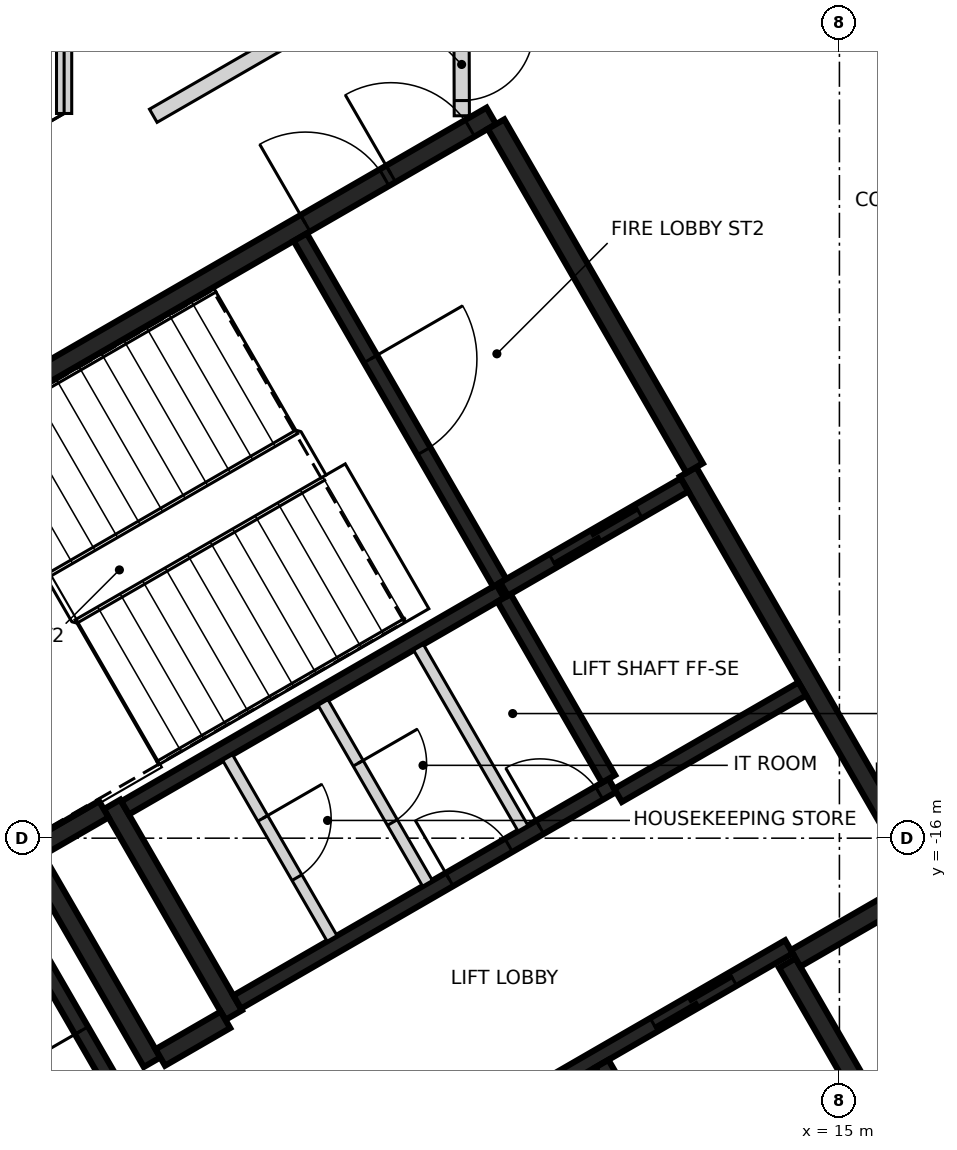
"""IFC4 building model, lengths in metres.
Left out: names, types, materials, properties, quantities, classifications, styles, units other than length and angle.
Written with IfcOpenShell. Run it as: python <this file> out.ifc"""

import sys

from ifc_helpers import new_model, si_unit, direction, frame, frame_2d, origin, place, context, subcontext, project, spatial, rectangle, extrude, element, fill, save


model = new_model("IFC4")
c1 = context("Model", 3, precision=1e-05, world=origin(), true_north=direction((0.0, 1.0)))
c2 = subcontext(c1, "Body", "Model", "MODEL_VIEW")
j1 = project(units=[si_unit("LENGTHUNIT", "METRE"), si_unit("PLANEANGLEUNIT", "RADIAN")], contexts=[c1])
p1 = place(None, origin())
s1 = spatial("IfcSite", under=j1, at=p1, CompositionType="ELEMENT")
p2 = place(p1, origin())
s2 = spatial("IfcBuilding", under=s1, at=p2, CompositionType="ELEMENT")
p3 = place(p2, frame((0.0, 0.0, 157.6)))
s3 = spatial("IfcBuildingStorey", under=s2, at=p3, CompositionType="ELEMENT", Elevation=157.6)
p4 = place(p3, frame((0.417, -12.273, 0.0), z_axis=(0.0, 0.0, 1.0), x_axis=(0.866021906294, 0.500006057782, 0.0)))
e1 = element("IfcWall", 1, at=p4, inside=s3, PredefinedType="SHEAR", context=c2, shape_type="SweptSolid", body=[
    extrude(rectangle(XDim=11.55, YDim=0.25, at=frame_2d((5.775, 0.0))), origin(), (0.0, 0.0, 1.0), 3.2),
])
p5 = place(p4, frame((10.025, 0.0, 0.0)))
e2 = element("IfcOpeningElement", 2, at=p5, cuts=e1, PredefinedType="OPENING", context=c2, shape_type="SweptSolid", body=[
    extrude(rectangle(XDim=1.2, YDim=2.1, at=frame_2d((0.6, 1.05))), frame((0.0, 0.135, 0.0), z_axis=(0.0, -1.0, 0.0), x_axis=(1.0, 0.0, 0.0)), (0.0, 0.0, 1.0), 0.27),
])
p6 = place(p4, frame((8.725, 0.0, 0.0)))
e3 = element("IfcOpeningElement", 3, at=p6, cuts=e1, PredefinedType="OPENING", context=c2, shape_type="SweptSolid", body=[
    extrude(rectangle(XDim=1.2, YDim=2.1, at=frame_2d((0.6, 1.05))), frame((0.0, 0.135, 0.0), z_axis=(0.0, -1.0, 0.0), x_axis=(1.0, 0.0, 0.0)), (0.0, 0.0, 1.0), 0.27),
])
p7 = place(p3, frame((13.008, -11.181, 0.0), z_axis=(0.0, 0.0, 1.0), x_axis=(0.500004234368, -0.866022959057, 0.0)))
e4 = element("IfcWall", 4, at=p7, inside=s3, PredefinedType="SHEAR", context=c2, shape_type="SweptSolid", body=[
    extrude(rectangle(XDim=6.25, YDim=0.25, at=frame_2d((3.125, 0.0))), origin(), (0.0, 0.0, 1.0), 3.2),
])
p8 = place(p3, frame((10.483, -6.606, 0.0), z_axis=(0.0, 0.0, 1.0), x_axis=(0.49999885962, -0.866026062182, 0.0)))
e5 = element("IfcWall", 5, at=p8, inside=s3, PredefinedType="SHEAR", context=c2, shape_type="SweptSolid", body=[
    extrude(rectangle(XDim=5.225, YDim=0.25, at=frame_2d((2.612, 0.0))), origin(), (0.0, 0.0, 1.0), 3.2),
])
p9 = place(p3, frame((7.031, -18.327, 0.0), z_axis=(0.0, 0.0, 1.0), x_axis=(-0.499971222258, 0.866042017984, 0.0)))
e6 = element("IfcWall", 6, at=p9, inside=s3, PredefinedType="SHEAR", context=c2, shape_type="SweptSolid", body=[
    extrude(rectangle(XDim=3.2, YDim=0.25, at=frame_2d((1.6, 0.0))), origin(), (0.0, 0.0, 1.0), 3.2),
])
p10 = place(p3, frame((14.315, -17.644, 0.0), z_axis=(0.0, 0.0, 1.0), x_axis=(0.500023226632, -0.866011993467, 0.0)))
e7 = element("IfcWall", 7, at=p10, inside=s3, PredefinedType="SHEAR", context=c2, shape_type="SweptSolid", body=[
    extrude(rectangle(XDim=2.974, YDim=0.25, at=frame_2d((1.487, 0.0))), origin(), (0.0, 0.0, 1.0), 3.2),
])
p11 = place(p3, frame((4.414, -16.276, 0.0), z_axis=(0.0, 0.0, 1.0), x_axis=(0.500003324108, -0.866023484601, 0.0)))
e8 = element("IfcWall", 8, at=p11, inside=s3, PredefinedType="SHEAR", context=c2, shape_type="SweptSolid", body=[
    extrude(rectangle(XDim=3.085, YDim=0.25, at=frame_2d((1.542, 0.0))), origin(), (0.0, 0.0, 1.0), 3.2),
])
p12 = place(p3, frame((5.322, -15.619, 0.0), z_axis=(0.0, 0.0, 1.0), x_axis=(-0.866026229868, -0.499998569178, 0.0)))
e9 = element("IfcWall", 9, at=p12, inside=s3, PredefinedType="SHEAR", context=c2, shape_type="SweptSolid", body=[
    extrude(rectangle(XDim=2.449, YDim=0.25, at=frame_2d((1.225, 0.0))), origin(), (0.0, 0.0, 1.0), 3.2),
])
p13 = place(p3, frame((16.025, -16.656, 0.0), z_axis=(0.0, 0.0, 1.0), x_axis=(-0.866016279763, -0.500015802937, 0.0)))
e10 = element("IfcWall", 10, at=p13, inside=s3, PredefinedType="SHEAR", context=c2, shape_type="SweptSolid", body=[
    extrude(rectangle(XDim=1.849, YDim=0.25, at=frame_2d((0.925, 0.0))), origin(), (0.0, 0.0, 1.0), 3.2),
])
p14 = place(p3, frame((6.065, -18.885, 0.0), z_axis=(0.0, 0.0, 1.0), x_axis=(0.866017078145, 0.500014420154, 0.0)))
e11 = element("IfcWall", 11, at=p14, inside=s3, PredefinedType="SHEAR", context=c2, shape_type="SweptSolid", body=[
    extrude(rectangle(XDim=0.989, YDim=0.25, at=frame_2d((0.495, 0.0))), origin(), (0.0, 0.0, 1.0), 3.2),
])
p15 = place(p3, frame((9.052, -20.48, 0.0), z_axis=(0.0, 0.0, 1.0), x_axis=(0.866030299012, 0.499991521122, 0.0)))
e12 = element("IfcWall", 12, at=p15, inside=s3, PredefinedType="SHEAR", context=c2, shape_type="SweptSolid", body=[
    extrude(rectangle(XDim=6.1, YDim=0.2, at=frame_2d((3.05, 0.0))), origin(), (0.0, 0.0, 1.0), 3.2),
])
p16 = place(p15, frame((1.0, 0.0, 0.0)))
e13 = element("IfcOpeningElement", 13, at=p16, cuts=e12, PredefinedType="OPENING", context=c2, shape_type="SweptSolid", body=[
    extrude(rectangle(XDim=1.2, YDim=2.1, at=frame_2d((0.6, 1.05))), frame((0.0, 0.11, 0.0), z_axis=(0.0, -1.0, 0.0), x_axis=(1.0, 0.0, 0.0)), (0.0, 0.0, 1.0), 0.22),
])
p17 = place(p15, frame((4.05, 0.0, 0.0)))
e14 = element("IfcOpeningElement", 14, at=p17, cuts=e12, PredefinedType="OPENING", context=c2, shape_type="SweptSolid", body=[
    extrude(rectangle(XDim=1.2, YDim=2.1, at=frame_2d((0.6, 1.05))), frame((0.0, 0.11, 0.0), z_axis=(0.0, -1.0, 0.0), x_axis=(1.0, 0.0, 0.0)), (0.0, 0.0, 1.0), 0.22),
])
p18 = place(p3, frame((10.538, -12.752, 0.0), z_axis=(0.0, 0.0, 1.0), x_axis=(-0.866038630372, -0.499977090179, 0.0)))
e15 = element("IfcWall", 15, at=p18, inside=s3, PredefinedType="SHEAR", context=c2, shape_type="SweptSolid", body=[
    extrude(rectangle(XDim=5.699, YDim=0.2, at=frame_2d((2.85, 0.0))), origin(), (0.0, 0.0, 1.0), 3.2),
])
p19 = place(p3, frame((7.077, -18.156, 0.0), z_axis=(0.0, 0.0, 1.0), x_axis=(0.866038630372, 0.499977090179, 0.0)))
e16 = element("IfcWall", 16, at=p19, inside=s3, PredefinedType="SHEAR", context=c2, shape_type="SweptSolid", body=[
    extrude(rectangle(XDim=5.699, YDim=0.2, at=frame_2d((2.85, 0.0))), origin(), (0.0, 0.0, 1.0), 3.2),
])
p20 = place(p19, frame((3.224, 0.0, 0.0)))
e17 = element("IfcOpeningElement", 17, at=p20, cuts=e16, PredefinedType="OPENING", context=c2, shape_type="SweptSolid", body=[
    extrude(rectangle(XDim=0.9, YDim=2.1, at=frame_2d((0.45, 1.05))), frame((0.0, 0.11, 0.0), z_axis=(0.0, -1.0, 0.0), x_axis=(1.0, 0.0, 0.0)), (0.0, 0.0, 1.0), 0.22),
])
p21 = place(p19, frame((4.599, 0.0, 0.0)))
e18 = element("IfcOpeningElement", 18, at=p21, cuts=e16, PredefinedType="OPENING", context=c2, shape_type="SweptSolid", body=[
    extrude(rectangle(XDim=0.9, YDim=2.1, at=frame_2d((0.45, 1.05))), frame((0.0, 0.11, 0.0), z_axis=(0.0, -1.0, 0.0), x_axis=(1.0, 0.0, 0.0)), (0.0, 0.0, 1.0), 0.22),
])
p22 = place(p3, frame((7.906, -8.094, 0.0), z_axis=(0.0, 0.0, 1.0), x_axis=(0.500024287448, -0.866011380966, 0.0)))
e19 = element("IfcWall", 19, at=p22, inside=s3, PredefinedType="SHEAR", context=c2, shape_type="SweptSolid", body=[
    extrude(rectangle(XDim=5.251, YDim=0.2, at=frame_2d((2.625, 0.0))), origin(), (0.0, 0.0, 1.0), 3.2),
])
p23 = place(p22, frame((1.849, 0.0, 0.0)))
e20 = element("IfcOpeningElement", 20, at=p23, cuts=e19, PredefinedType="OPENING", context=c2, shape_type="SweptSolid", body=[
    extrude(rectangle(XDim=1.4, YDim=2.1, at=frame_2d((0.7, 1.05))), frame((0.0, 0.11, 0.0), z_axis=(0.0, -1.0, 0.0), x_axis=(1.0, 0.0, 0.0)), (0.0, 0.0, 1.0), 0.22),
])
p24 = place(p3, frame((11.875, -18.967, 0.0), z_axis=(0.0, 0.0, 1.0), x_axis=(0.49998131003, -0.866036194175, 0.0)))
e21 = element("IfcWall", 21, at=p24, inside=s3, PredefinedType="SHEAR", context=c2, shape_type="SweptSolid", body=[
    extrude(rectangle(XDim=3.048, YDim=0.2, at=frame_2d((1.524, 0.0))), origin(), (0.0, 0.0, 1.0), 3.2),
])
p25 = place(p3, frame((5.503, -19.352, 0.0), z_axis=(0.0, 0.0, 1.0), x_axis=(-0.499986818241, 0.866033014143, 0.0)))
e22 = element("IfcWall", 22, at=p25, inside=s3, PredefinedType="SHEAR", context=c2, shape_type="SweptSolid", body=[
    extrude(rectangle(XDim=2.798, YDim=0.2, at=frame_2d((1.399, 0.0))), origin(), (0.0, 0.0, 1.0), 3.2),
])
p26 = place(p25, frame((0.949, 0.0, 0.0)))
e23 = element("IfcOpeningElement", 23, at=p26, cuts=e22, PredefinedType="OPENING", context=c2, shape_type="SweptSolid", body=[
    extrude(rectangle(XDim=0.9, YDim=2.1, at=frame_2d((0.45, 1.05))), frame((0.0, 0.11, 0.0), z_axis=(0.0, -1.0, 0.0), x_axis=(1.0, 0.0, 0.0)), (0.0, 0.0, 1.0), 0.22),
])
p27 = place(p3, frame((11.963, -15.22, 0.0), z_axis=(0.0, 0.0, 1.0), x_axis=(-0.500034990121, 0.866005201286, 0.0)))
e24 = element("IfcWall", 24, at=p27, inside=s3, PredefinedType="SHEAR", context=c2, shape_type="SweptSolid", body=[
    extrude(rectangle(XDim=2.75, YDim=0.2, at=frame_2d((1.375, 0.0))), origin(), (0.0, 0.0, 1.0), 3.2),
])
p28 = place(p3, frame((10.587, -12.723, 0.0), z_axis=(0.0, 0.0, 1.0), x_axis=(0.866037306777, 0.499979382845, 0.0)))
e25 = element("IfcWall", 25, at=p28, inside=s3, PredefinedType="SHEAR", context=c2, shape_type="SweptSolid", body=[
    extrude(rectangle(XDim=2.742, YDim=0.2, at=frame_2d((1.371, 0.0))), origin(), (0.0, 0.0, 1.0), 3.2),
])
p29 = place(p28, frame((0.743, 0.0, 0.0)))
e26 = element("IfcOpeningElement", 26, at=p29, cuts=e25, PredefinedType="OPENING", context=c2, shape_type="SweptSolid", body=[
    extrude(rectangle(XDim=1.3, YDim=2.1, at=frame_2d((0.65, 1.05))), frame((0.0, 0.11, 0.0), z_axis=(0.0, -1.0, 0.0), x_axis=(1.0, 0.0, 0.0)), (0.0, 0.0, 1.0), 0.22),
])
p30 = place(p3, frame((14.512, -14.037, 0.0), z_axis=(0.0, 0.0, 1.0), x_axis=(-0.866044696403, -0.499966582715, 0.0)))
e27 = element("IfcWall", 27, at=p30, inside=s3, PredefinedType="SHEAR", context=c2, shape_type="SweptSolid", body=[
    extrude(rectangle(XDim=2.799, YDim=0.2, at=frame_2d((1.399, 0.0))), origin(), (0.0, 0.0, 1.0), 3.2),
])
p31 = place(p3, frame((8.207, -14.214, 0.0), z_axis=(0.0, 0.0, 1.0), x_axis=(0.50002746344, -0.86600954718, 0.0)))
e28 = element("IfcWall", 28, at=p31, inside=s3, PredefinedType="PARTITIONING", context=c2, shape_type="SweptSolid", body=[
    extrude(rectangle(XDim=2.748, YDim=0.15, at=frame_2d((1.374, 0.0))), origin(), (0.0, 0.0, 1.0), 3.2),
])
p32 = place(p31, frame((0.924, 0.0, 0.0)))
e29 = element("IfcOpeningElement", 29, at=p32, cuts=e28, PredefinedType="OPENING", context=c2, shape_type="SweptSolid", body=[
    extrude(rectangle(XDim=0.9, YDim=2.1, at=frame_2d((0.45, 1.05))), frame((0.0, 0.085, 0.0), z_axis=(0.0, -1.0, 0.0), x_axis=(1.0, 0.0, 0.0)), (0.0, 0.0, 1.0), 0.17),
])
p33 = place(p3, frame((9.462, -13.489, 0.0), z_axis=(0.0, 0.0, 1.0), x_axis=(0.499988999718, -0.866031754707, 0.0)))
e30 = element("IfcWall", 30, at=p33, inside=s3, PredefinedType="PARTITIONING", context=c2, shape_type="SweptSolid", body=[
    extrude(rectangle(XDim=2.749, YDim=0.15, at=frame_2d((1.374, 0.0))), origin(), (0.0, 0.0, 1.0), 3.2),
])
p34 = place(p3, frame((6.951, -14.939, 0.0), z_axis=(0.0, 0.0, 1.0), x_axis=(0.499988999718, -0.866031754707, 0.0)))
e31 = element("IfcWall", 31, at=p34, inside=s3, PredefinedType="PARTITIONING", context=c2, shape_type="SweptSolid", body=[
    extrude(rectangle(XDim=2.749, YDim=0.15, at=frame_2d((1.374, 0.0))), origin(), (0.0, 0.0, 1.0), 3.2),
])
p35 = place(p34, frame((0.924, 0.0, 0.0)))
e32 = element("IfcOpeningElement", 32, at=p35, cuts=e31, PredefinedType="OPENING", context=c2, shape_type="SweptSolid", body=[
    extrude(rectangle(XDim=0.9, YDim=2.1, at=frame_2d((0.45, 1.05))), frame((0.0, 0.085, 0.0), z_axis=(0.0, -1.0, 0.0), x_axis=(1.0, 0.0, 0.0)), (0.0, 0.0, 1.0), 0.17),
])
p36 = place(p3, frame((5.973, -6.496, 0.0), z_axis=(0.0, 0.0, 1.0), x_axis=(0.866175166619, 0.4997405134, 0.0)))
e33 = element("IfcWall", 33, at=p36, inside=s3, PredefinedType="PARTITIONING", context=c2, shape_type="SweptSolid", body=[
    extrude(rectangle(XDim=2.341, YDim=0.2, at=frame_2d((1.17, 0.0))), origin(), (0.0, 0.0, 1.0), 3.2),
])
p37 = place(p3, frame((10.0, 4.078, 0.0), z_axis=(0.0, 0.0, 1.0), x_axis=(0.003070798941, -0.999995285086, 0.0)))
e34 = element("IfcWall", 34, at=p37, inside=s3, PredefinedType="PARTITIONING", context=c2, shape_type="SweptSolid", body=[
    extrude(rectangle(XDim=10.574, YDim=0.2, at=frame_2d((5.287, 0.0))), origin(), (0.0, 0.0, 1.0), 3.2),
])
p38 = place(p37, frame((9.424, 0.0, 0.0)))
e35 = element("IfcOpeningElement", 35, at=p38, cuts=e34, PredefinedType="OPENING", context=c2, shape_type="SweptSolid", body=[
    extrude(rectangle(XDim=0.95, YDim=2.1, at=frame_2d((0.475, 1.05))), frame((0.0, 0.11, 0.0), z_axis=(0.0, -1.0, 0.0), x_axis=(1.0, 0.0, 0.0)), (0.0, 0.0, 1.0), 0.22),
])
p39 = place(p37, frame((2.651, 0.0, 0.0)))
e36 = element("IfcOpeningElement", 36, at=p39, cuts=e34, PredefinedType="OPENING", context=c2, shape_type="SweptSolid", body=[
    extrude(rectangle(XDim=0.95, YDim=2.1, at=frame_2d((0.475, 1.05))), frame((0.0, 0.11, 0.0), z_axis=(0.0, -1.0, 0.0), x_axis=(1.0, 0.0, 0.0)), (0.0, 0.0, 1.0), 0.22),
])
p40 = place(p3, frame((4.8, -6.466, 0.0), z_axis=(0.0, 0.0, 1.0), x_axis=(0.0, 1.0, 0.0)))
e37 = element("IfcWall", 37, at=p40, inside=s3, PredefinedType="PARTITIONING", context=c2, shape_type="SweptSolid", body=[
    extrude(rectangle(XDim=12.932, YDim=0.2, at=frame_2d((6.466, 0.0))), origin(), (0.0, 0.0, 1.0), 2.3),
])
p41 = place(p3, frame((15.498, -15.124, 0.0), z_axis=(0.0, 0.0, 1.0), x_axis=(1.0, 0.0, 0.0)))
e38 = element("IfcWall", 38, at=p41, inside=s3, PredefinedType="PARTITIONING", context=c2, shape_type="SweptSolid", body=[
    extrude(rectangle(XDim=5.008, YDim=0.2, at=frame_2d((2.504, 0.0))), origin(), (0.0, 0.0, 1.0), 3.2),
])
p42 = place(p29, origin())
e39 = element("IfcDoor", 39, at=p42, inside=s3, OperationType="SLIDING_TO_RIGHT", PredefinedType="DOOR", context=c2, shape_type="SweptSolid", body=[
    extrude(rectangle(XDim=1.3, YDim=2.1, at=frame_2d((0.65, 1.05))), frame((0.0, 0.025, 0.0), z_axis=(0.0, -1.0, 0.0), x_axis=(1.0, 0.0, 0.0)), (0.0, 0.0, 1.0), 0.05),
])
fill(e26, e39)
p43 = place(p17, origin())
e40 = element("IfcDoor", 40, at=p43, inside=s3, OperationType="DOUBLE_DOOR_SLIDING", PredefinedType="DOOR", context=c2, shape_type="SweptSolid", body=[
    extrude(rectangle(XDim=1.2, YDim=2.1, at=frame_2d((0.6, 1.05))), frame((0.0, 0.025, 0.0), z_axis=(0.0, -1.0, 0.0), x_axis=(1.0, 0.0, 0.0)), (0.0, 0.0, 1.0), 0.05),
])
fill(e14, e40)
p44 = place(p5, origin())
e41 = element("IfcDoor", 41, at=p44, inside=s3, OperationType="SINGLE_SWING_LEFT", PredefinedType="DOOR", context=c2, shape_type="SweptSolid", body=[
    extrude(rectangle(XDim=1.2, YDim=2.1, at=frame_2d((0.6, 1.05))), frame((0.0, 0.025, 0.0), z_axis=(0.0, -1.0, 0.0), x_axis=(1.0, 0.0, 0.0)), (0.0, 0.0, 1.0), 0.05),
])
fill(e2, e41)
p45 = place(p6, origin())
e42 = element("IfcDoor", 42, at=p45, inside=s3, OperationType="SINGLE_SWING_RIGHT", PredefinedType="DOOR", context=c2, shape_type="SweptSolid", body=[
    extrude(rectangle(XDim=1.2, YDim=2.1, at=frame_2d((0.6, 1.05))), frame((0.0, 0.025, 0.0), z_axis=(0.0, -1.0, 0.0), x_axis=(1.0, 0.0, 0.0)), (0.0, 0.0, 1.0), 0.05),
])
fill(e3, e42)
p46 = place(p23, origin())
e43 = element("IfcDoor", 43, at=p46, inside=s3, OperationType="SINGLE_SWING_RIGHT", PredefinedType="DOOR", context=c2, shape_type="SweptSolid", body=[
    extrude(rectangle(XDim=1.4, YDim=2.1, at=frame_2d((0.7, 1.05))), frame((0.0, 0.025, 0.0), z_axis=(0.0, -1.0, 0.0), x_axis=(1.0, 0.0, 0.0)), (0.0, 0.0, 1.0), 0.05),
])
fill(e20, e43)
p47 = place(p20, origin())
e44 = element("IfcDoor", 44, at=p47, inside=s3, OperationType="SINGLE_SWING_LEFT", PredefinedType="DOOR", context=c2, shape_type="SweptSolid", body=[
    extrude(rectangle(XDim=0.9, YDim=2.1, at=frame_2d((0.45, 1.05))), frame((0.0, 0.025, 0.0), z_axis=(0.0, -1.0, 0.0), x_axis=(1.0, 0.0, 0.0)), (0.0, 0.0, 1.0), 0.05),
])
fill(e17, e44)
p48 = place(p21, origin())
e45 = element("IfcDoor", 45, at=p48, inside=s3, OperationType="SINGLE_SWING_RIGHT", PredefinedType="DOOR", context=c2, shape_type="SweptSolid", body=[
    extrude(rectangle(XDim=0.9, YDim=2.1, at=frame_2d((0.45, 1.05))), frame((0.0, 0.025, 0.0), z_axis=(0.0, -1.0, 0.0), x_axis=(1.0, 0.0, 0.0)), (0.0, 0.0, 1.0), 0.05),
])
fill(e18, e45)
p49 = place(p26, origin())
e46 = element("IfcDoor", 46, at=p49, inside=s3, OperationType="SINGLE_SWING_LEFT", PredefinedType="DOOR", context=c2, shape_type="SweptSolid", body=[
    extrude(rectangle(XDim=0.9, YDim=2.1, at=frame_2d((0.45, 1.05))), frame((0.0, 0.025, 0.0), z_axis=(0.0, -1.0, 0.0), x_axis=(1.0, 0.0, 0.0)), (0.0, 0.0, 1.0), 0.05),
])
fill(e23, e46)
p50 = place(p32, origin())
e47 = element("IfcDoor", 47, at=p50, inside=s3, OperationType="SINGLE_SWING_RIGHT", PredefinedType="DOOR", context=c2, shape_type="SweptSolid", body=[
    extrude(rectangle(XDim=0.9, YDim=2.1, at=frame_2d((0.45, 1.05))), frame((0.0, 0.025, 0.0), z_axis=(0.0, -1.0, 0.0), x_axis=(1.0, 0.0, 0.0)), (0.0, 0.0, 1.0), 0.05),
])
fill(e29, e47)
p51 = place(p35, origin())
e48 = element("IfcDoor", 48, at=p51, inside=s3, OperationType="SINGLE_SWING_LEFT", PredefinedType="DOOR", context=c2, shape_type="SweptSolid", body=[
    extrude(rectangle(XDim=0.9, YDim=2.1, at=frame_2d((0.45, 1.05))), frame((0.0, 0.025, 0.0), z_axis=(0.0, -1.0, 0.0), x_axis=(1.0, 0.0, 0.0)), (0.0, 0.0, 1.0), 0.05),
])
fill(e32, e48)
p52 = place(p38, origin())
e49 = element("IfcDoor", 49, at=p52, inside=s3, OperationType="SINGLE_SWING_LEFT", PredefinedType="DOOR", context=c2, shape_type="SweptSolid", body=[
    extrude(rectangle(XDim=0.95, YDim=2.1, at=frame_2d((0.475, 1.05))), frame((0.0, 0.025, 0.0), z_axis=(0.0, -1.0, 0.0), x_axis=(1.0, 0.0, 0.0)), (0.0, 0.0, 1.0), 0.05),
])
fill(e35, e49)
save(model, sys.argv[1])
